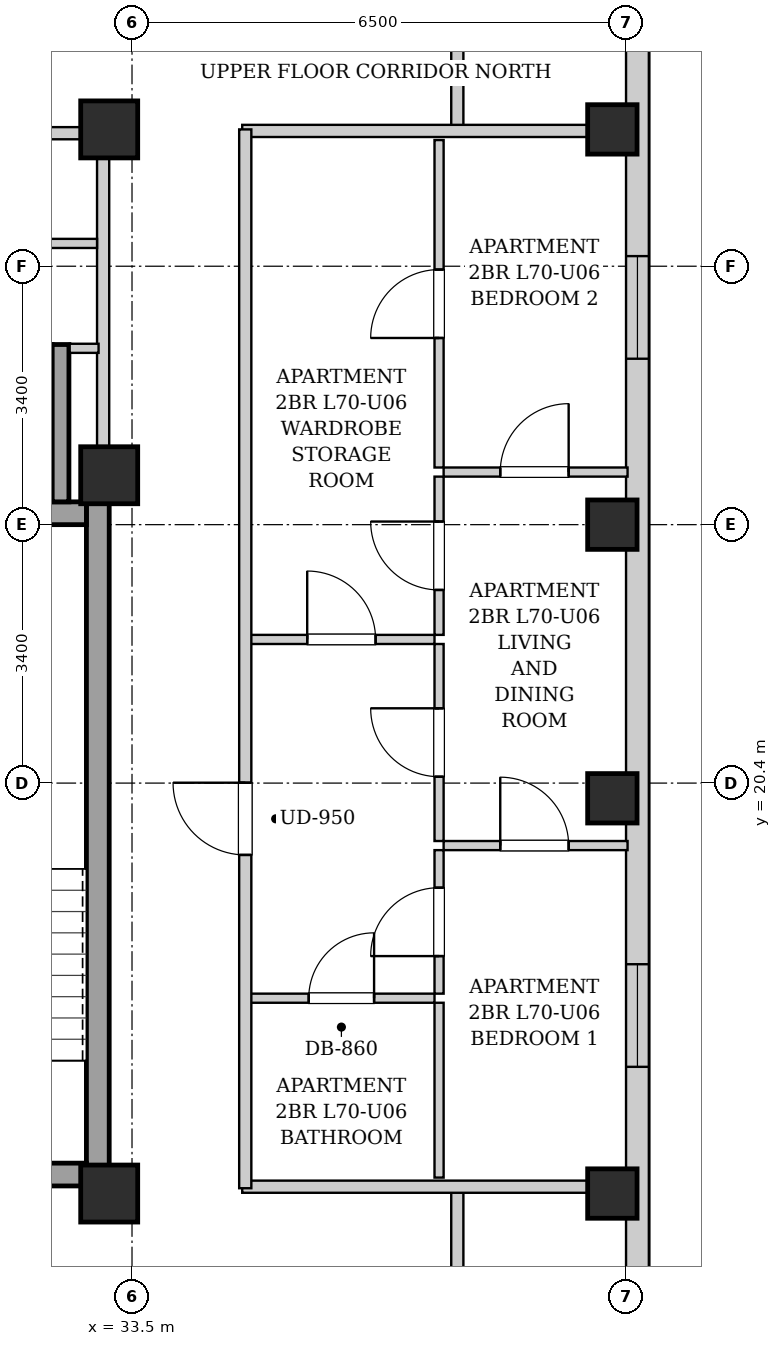
"""IFC4 building model, lengths in metres.
Left out: names, types, materials, properties, quantities, classifications, styles, units other than length and angle.
Written with IfcOpenShell. Run it as: python <this file> out.ifc"""

import sys

from ifc_helpers import new_model, si_unit, direction, frame, frame_2d, origin, origin_2d, place, context, subcontext, project, spatial, rectangle, extrude, element, fill, save


model = new_model("IFC4")
c1 = context("Model", 3, precision=1e-05, world=origin(), true_north=direction((0.0, 1.0)))
c2 = subcontext(c1, "Body", "Model", "MODEL_VIEW")
j1 = project(units=[si_unit("LENGTHUNIT", "METRE"), si_unit("PLANEANGLEUNIT", "RADIAN")], contexts=[c1])
p1 = place(None, origin())
s1 = spatial("IfcSite", under=j1, at=p1, CompositionType="ELEMENT")
p2 = place(p1, origin())
s2 = spatial("IfcBuilding", under=s1, at=p2, CompositionType="ELEMENT")
p3 = place(p2, frame((0.0, 0.0, 241.1)))
s3 = spatial("IfcBuildingStorey", under=s2, at=p3, CompositionType="ELEMENT", Elevation=241.1)
for number, where, z_axis, x_axis in (
    (1, (39.82, 15.0, 0.0), (0.0, 0.0, 1.0), (1.0, 0.0, 0.0)),
    (2, (39.82, 20.2, 0.0), (0.0, 0.0, 1.0), (1.0, 0.0, 0.0)),
    (3, (39.82, 23.8, 0.0), (0.0, 0.0, 1.0), (1.0, 0.0, 0.0)),
    (4, (39.82, 29.0, 0.0), (0.0, 0.0, 1.0), (1.0, 0.0, 0.0)),
):
    element("IfcColumn", number, at=place(p3, frame(where, z_axis=z_axis, x_axis=x_axis)), inside=s3, PredefinedType="COLUMN", context=c2, shape_type="SweptSolid", body=[
        extrude(rectangle(XDim=0.65, YDim=0.65, at=origin_2d()), origin(), (0.0, 0.0, 1.0), 3.4),
    ])
for number, where, z_axis, x_axis in (
    (5, (33.2, 15.0, 0.0), (0.0, 0.0, 1.0), (1.0, 0.0, 0.0)),
    (6, (33.2, 29.0, 0.0), (0.0, 0.0, 1.0), (1.0, 0.0, 0.0)),
    (7, (33.2, 24.45, 0.0), (0.0, 0.0, 1.0), (1.0, 0.0, 0.0)),
):
    element("IfcColumn", number, at=place(p3, frame(where, z_axis=z_axis, x_axis=x_axis)), inside=s3, PredefinedType="COLUMN", context=c2, shape_type="SweptSolid", body=[
        extrude(rectangle(XDim=0.75, YDim=0.75, at=origin_2d()), origin(), (0.0, 0.0, 1.0), 3.4),
    ])
p4 = place(p3, frame((40.15, 37.7, 0.0), z_axis=(0.0, 0.0, 1.0), x_axis=(0.0, -1.0, 0.0)))
e8 = element("IfcWall", 8, at=p4, inside=s3, PredefinedType="SOLIDWALL", context=c2, shape_type="SweptSolid", body=[
    extrude(rectangle(XDim=31.4, YDim=0.3, at=frame_2d((15.7, 0.0))), origin(), (0.0, 0.0, 1.0), 3.14),
])
p5 = place(p4, frame((28.396, 0.0, 0.55)))
e9 = element("IfcOpeningElement", 9, at=p5, cuts=e8, PredefinedType="OPENING", context=c2, shape_type="SweptSolid", body=[
    extrude(rectangle(XDim=1.35, YDim=1.2, at=frame_2d((0.675, 0.6))), frame((0.0, 0.16, 0.0), z_axis=(0.0, -1.0, 0.0), x_axis=(1.0, 0.0, 0.0)), (0.0, 0.0, 1.0), 0.32),
])
p6 = place(p4, frame((1.653, 0.0, 0.55)))
e10 = element("IfcOpeningElement", 10, at=p6, cuts=e8, PredefinedType="OPENING", context=c2, shape_type="SweptSolid", body=[
    extrude(rectangle(XDim=1.35, YDim=1.2, at=frame_2d((0.675, 0.6))), frame((0.0, 0.16, 0.0), z_axis=(0.0, -1.0, 0.0), x_axis=(1.0, 0.0, 0.0)), (0.0, 0.0, 1.0), 0.32),
])
p7 = place(p4, frame((19.683, 0.0, 0.55)))
e11 = element("IfcOpeningElement", 11, at=p7, cuts=e8, PredefinedType="OPENING", context=c2, shape_type="SweptSolid", body=[
    extrude(rectangle(XDim=1.35, YDim=1.2, at=frame_2d((0.675, 0.6))), frame((0.0, 0.16, 0.0), z_axis=(0.0, -1.0, 0.0), x_axis=(1.0, 0.0, 0.0)), (0.0, 0.0, 1.0), 0.32),
])
p8 = place(p4, frame((10.367, 0.0, 0.55)))
e12 = element("IfcOpeningElement", 12, at=p8, cuts=e8, PredefinedType="OPENING", context=c2, shape_type="SweptSolid", body=[
    extrude(rectangle(XDim=1.35, YDim=1.2, at=frame_2d((0.675, 0.6))), frame((0.0, 0.16, 0.0), z_axis=(0.0, -1.0, 0.0), x_axis=(1.0, 0.0, 0.0)), (0.0, 0.0, 1.0), 0.32),
])
p9 = place(p3, frame((33.05, 15.1, 0.0), z_axis=(0.0, 0.0, 1.0), x_axis=(0.0, 1.0, 0.0)))
e13 = element("IfcWall", 13, at=p9, inside=s3, PredefinedType="SHEAR", context=c2, shape_type="SweptSolid", body=[
    extrude(rectangle(XDim=9.0, YDim=0.3, at=frame_2d((4.5, 0.0))), origin(), (0.0, 0.0, 1.0), 3.14),
])
p10 = place(p3, frame((30.05, 23.95, 0.0), z_axis=(0.0, 0.0, 1.0), x_axis=(1.0, 0.0, 0.0)))
e14 = element("IfcWall", 14, at=p10, inside=s3, PredefinedType="SHEAR", context=c2, shape_type="SweptSolid", body=[
    extrude(rectangle(XDim=2.85, YDim=0.3, at=frame_2d((1.425, 0.0))), origin(), (0.0, 0.0, 1.0), 3.14),
])
p11 = place(p3, frame((30.05, 15.25, 0.0), z_axis=(0.0, 0.0, 1.0), x_axis=(1.0, 0.0, 0.0)))
e15 = element("IfcWall", 15, at=p11, inside=s3, PredefinedType="SHEAR", context=c2, shape_type="SweptSolid", body=[
    extrude(rectangle(XDim=2.85, YDim=0.3, at=frame_2d((1.425, 0.0))), origin(), (0.0, 0.0, 1.0), 3.14),
])
p12 = place(p11, frame((0.86, 0.0, 0.0)))
e16 = element("IfcOpeningElement", 16, at=p12, cuts=e15, PredefinedType="OPENING", context=c2, shape_type="SweptSolid", body=[
    extrude(rectangle(XDim=1.1, YDim=2.05, at=frame_2d((0.55, 1.025))), frame((0.0, 0.16, 0.0), z_axis=(0.0, -1.0, 0.0), x_axis=(1.0, 0.0, 0.0)), (0.0, 0.0, 1.0), 0.32),
])
p13 = place(p3, frame((32.56, 24.1, 0.0), z_axis=(0.0, 0.0, 1.0), x_axis=(0.0, 1.0, 0.0)))
e17 = element("IfcWall", 17, at=p13, inside=s3, PredefinedType="SHEAR", context=c2, shape_type="SweptSolid", body=[
    extrude(rectangle(XDim=2.07, YDim=0.22, at=frame_2d((1.035, 0.0))), origin(), (0.0, 0.0, 1.0), 3.14),
])
p14 = place(p3, frame((33.12, 24.12, 0.0), z_axis=(0.0, 0.0, 1.0), x_axis=(0.0, 1.0, 0.0)))
e18 = element("IfcWall", 18, at=p14, inside=s3, PredefinedType="PARTITIONING", context=c2, shape_type="SweptSolid", body=[
    extrude(rectangle(XDim=4.76, YDim=0.16, at=frame_2d((2.38, 0.0))), origin(), (0.0, 0.0, 1.0), 3.14),
])
p15 = place(p3, frame((32.68, 26.12, 0.0), z_axis=(0.0, 0.0, 1.0), x_axis=(1.0, 0.0, 0.0)))
e19 = element("IfcWall", 19, at=p15, inside=s3, PredefinedType="PARTITIONING", context=c2, shape_type="SweptSolid", body=[
    extrude(rectangle(XDim=0.38, YDim=0.12, at=frame_2d((0.19, 0.0))), origin(), (0.0, 0.0, 1.0), 3.14),
])
p16 = place(p3, frame((30.12, 27.5, 0.0), z_axis=(0.0, 0.0, 1.0), x_axis=(1.0, 0.0, 0.0)))
e20 = element("IfcWall", 20, at=p16, inside=s3, PredefinedType="PARTITIONING", context=c2, shape_type="SweptSolid", body=[
    extrude(rectangle(XDim=2.92, YDim=0.12, at=frame_2d((1.46, 0.0))), origin(), (0.0, 0.0, 1.0), 3.14),
])
p17 = place(p16, frame((0.97, 0.0, 0.0)))
e21 = element("IfcOpeningElement", 21, at=p17, cuts=e20, PredefinedType="OPENING", context=c2, shape_type="SweptSolid", body=[
    extrude(rectangle(XDim=0.86, YDim=2.05, at=frame_2d((0.43, 1.025))), frame((0.0, 0.07, 0.0), z_axis=(0.0, -1.0, 0.0), x_axis=(1.0, 0.0, 0.0)), (0.0, 0.0, 1.0), 0.14),
])
p18 = place(p3, frame((25.72, 28.95, 0.0), z_axis=(0.0, 0.0, 1.0), x_axis=(1.0, 0.0, 0.0)))
e22 = element("IfcWall", 22, at=p18, inside=s3, PredefinedType="PARTITIONING", context=c2, shape_type="SweptSolid", body=[
    extrude(rectangle(XDim=7.32, YDim=0.16, at=frame_2d((3.66, 0.0))), origin(), (0.0, 0.0, 1.0), 2.668),
])
p19 = place(p18, frame((1.27, 0.0, 0.0)))
e23 = element("IfcOpeningElement", 23, at=p19, cuts=e22, PredefinedType="OPENING", context=c2, shape_type="SweptSolid", body=[
    extrude(rectangle(XDim=0.86, YDim=2.05, at=frame_2d((0.43, 1.025))), frame((0.0, 0.09, 0.0), z_axis=(0.0, -1.0, 0.0), x_axis=(1.0, 0.0, 0.0)), (0.0, 0.0, 1.0), 0.18),
])
for number, where, z_axis, x_axis in (
    (24, (37.78, 13.51, 0.0), (0.0, 0.0, 1.0), (0.0, 1.0, 0.0)),
    (25, (37.78, 28.98, 0.0), (0.0, 0.0, 1.0), (0.0, 1.0, 0.0)),
):
    element("IfcWall", number, at=place(p3, frame(where, z_axis=z_axis, x_axis=x_axis)), inside=s3, PredefinedType="PARTITIONING", context=c2, shape_type="SweptSolid", body=[
        extrude(rectangle(XDim=1.58, YDim=0.16, at=frame_2d((0.79, 0.0))), origin(), (0.0, 0.0, 1.0), 3.14),
    ])
for number, where, z_axis, x_axis in (
    (26, (34.95, 15.09, 0.0), (0.0, 0.0, 1.0), (1.0, 0.0, 0.0)),
    (27, (34.95, 28.98, 0.0), (0.0, 0.0, 1.0), (1.0, 0.0, 0.0)),
):
    element("IfcWall", number, at=place(p3, frame(where, z_axis=z_axis, x_axis=x_axis)), inside=s3, PredefinedType="PARTITIONING", context=c2, shape_type="SweptSolid", body=[
        extrude(rectangle(XDim=5.07, YDim=0.16, at=frame_2d((2.535, 0.0))), origin(), (0.0, 0.0, 1.0), 2.668),
    ])
p20 = place(p3, frame((35.03, 22.29, 0.0), z_axis=(0.0, 0.0, 1.0), x_axis=(1.0, 0.0, 0.0)))
e28 = element("IfcWall", 28, at=p20, inside=s3, PredefinedType="PARTITIONING", context=c2, shape_type="SweptSolid", body=[
    extrude(rectangle(XDim=2.45, YDim=0.12, at=frame_2d((1.225, 0.0))), origin(), (0.0, 0.0, 1.0), 3.14),
])
p21 = place(p20, frame((0.775, 0.0, 0.0)))
e29 = element("IfcOpeningElement", 29, at=p21, cuts=e28, PredefinedType="OPENING", context=c2, shape_type="SweptSolid", body=[
    extrude(rectangle(XDim=0.9, YDim=2.05, at=frame_2d((0.45, 1.025))), frame((0.0, 0.07, 0.0), z_axis=(0.0, -1.0, 0.0), x_axis=(1.0, 0.0, 0.0)), (0.0, 0.0, 1.0), 0.14),
])
p22 = place(p3, frame((37.54, 22.35, 0.0), z_axis=(0.0, 0.0, 1.0), x_axis=(0.0, 1.0, 0.0)))
e30 = element("IfcWall", 30, at=p22, inside=s3, PredefinedType="PARTITIONING", context=c2, shape_type="SweptSolid", body=[
    extrude(rectangle(XDim=2.082, YDim=0.12, at=frame_2d((1.041, 0.0))), origin(), (0.0, 0.0, 1.0), 3.14),
])
p23 = place(p22, frame((0.591, 0.0, 0.0)))
e31 = element("IfcOpeningElement", 31, at=p23, cuts=e30, PredefinedType="OPENING", context=c2, shape_type="SweptSolid", body=[
    extrude(rectangle(XDim=0.9, YDim=2.05, at=frame_2d((0.45, 1.025))), frame((0.0, 0.07, 0.0), z_axis=(0.0, -1.0, 0.0), x_axis=(1.0, 0.0, 0.0)), (0.0, 0.0, 1.0), 0.14),
])
p24 = place(p3, frame((37.54, 24.552, 0.0), z_axis=(0.0, 0.0, 1.0), x_axis=(0.0, 1.0, 0.0)))
e32 = element("IfcWall", 32, at=p24, inside=s3, PredefinedType="PARTITIONING", context=c2, shape_type="SweptSolid", body=[
    extrude(rectangle(XDim=4.308, YDim=0.12, at=frame_2d((2.154, 0.0))), origin(), (0.0, 0.0, 1.0), 3.14),
])
p25 = place(p24, frame((1.704, 0.0, 0.0)))
e33 = element("IfcOpeningElement", 33, at=p25, cuts=e32, PredefinedType="OPENING", context=c2, shape_type="SweptSolid", body=[
    extrude(rectangle(XDim=0.9, YDim=2.05, at=frame_2d((0.45, 1.025))), frame((0.0, 0.07, 0.0), z_axis=(0.0, -1.0, 0.0), x_axis=(1.0, 0.0, 0.0)), (0.0, 0.0, 1.0), 0.14),
])
p26 = place(p3, frame((35.03, 17.57, 0.0), z_axis=(0.0, 0.0, 1.0), x_axis=(1.0, 0.0, 0.0)))
e34 = element("IfcWall", 34, at=p26, inside=s3, PredefinedType="PARTITIONING", context=c2, shape_type="SweptSolid", body=[
    extrude(rectangle(XDim=2.45, YDim=0.12, at=frame_2d((1.225, 0.0))), origin(), (0.0, 0.0, 1.0), 3.14),
])
p27 = place(p26, frame((0.795, 0.0, 0.0)))
e35 = element("IfcOpeningElement", 35, at=p27, cuts=e34, PredefinedType="OPENING", context=c2, shape_type="SweptSolid", body=[
    extrude(rectangle(XDim=0.86, YDim=2.05, at=frame_2d((0.43, 1.025))), frame((0.0, 0.07, 0.0), z_axis=(0.0, -1.0, 0.0), x_axis=(1.0, 0.0, 0.0)), (0.0, 0.0, 1.0), 0.14),
])
p28 = place(p3, frame((37.54, 15.21, 0.0), z_axis=(0.0, 0.0, 1.0), x_axis=(0.0, 1.0, 0.0)))
e36 = element("IfcWall", 36, at=p28, inside=s3, PredefinedType="PARTITIONING", context=c2, shape_type="SweptSolid", body=[
    extrude(rectangle(XDim=2.3, YDim=0.12, at=frame_2d((1.15, 0.0))), origin(), (0.0, 0.0, 1.0), 3.14),
])
p29 = place(p3, frame((37.54, 17.63, 0.0), z_axis=(0.0, 0.0, 1.0), x_axis=(0.0, 1.0, 0.0)))
e37 = element("IfcWall", 37, at=p29, inside=s3, PredefinedType="PARTITIONING", context=c2, shape_type="SweptSolid", body=[
    extrude(rectangle(XDim=1.888, YDim=0.12, at=frame_2d((0.944, 0.0))), origin(), (0.0, 0.0, 1.0), 3.14),
])
p30 = place(p29, frame((0.494, 0.0, 0.0)))
e38 = element("IfcOpeningElement", 38, at=p30, cuts=e37, PredefinedType="OPENING", context=c2, shape_type="SweptSolid", body=[
    extrude(rectangle(XDim=0.9, YDim=2.05, at=frame_2d((0.45, 1.025))), frame((0.0, 0.07, 0.0), z_axis=(0.0, -1.0, 0.0), x_axis=(1.0, 0.0, 0.0)), (0.0, 0.0, 1.0), 0.14),
])
p31 = place(p3, frame((37.54, 19.638, 0.0), z_axis=(0.0, 0.0, 1.0), x_axis=(0.0, 1.0, 0.0)))
e39 = element("IfcWall", 39, at=p31, inside=s3, PredefinedType="PARTITIONING", context=c2, shape_type="SweptSolid", body=[
    extrude(rectangle(XDim=2.592, YDim=0.12, at=frame_2d((1.296, 0.0))), origin(), (0.0, 0.0, 1.0), 3.14),
])
p32 = place(p31, frame((0.846, 0.0, 0.0)))
e40 = element("IfcOpeningElement", 40, at=p32, cuts=e39, PredefinedType="OPENING", context=c2, shape_type="SweptSolid", body=[
    extrude(rectangle(XDim=0.9, YDim=2.05, at=frame_2d((0.45, 1.025))), frame((0.0, 0.07, 0.0), z_axis=(0.0, -1.0, 0.0), x_axis=(1.0, 0.0, 0.0)), (0.0, 0.0, 1.0), 0.14),
])
p33 = place(p3, frame((37.6, 19.578, 0.0), z_axis=(0.0, 0.0, 1.0), x_axis=(1.0, 0.0, 0.0)))
e41 = element("IfcWall", 41, at=p33, inside=s3, PredefinedType="PARTITIONING", context=c2, shape_type="SweptSolid", body=[
    extrude(rectangle(XDim=2.42, YDim=0.12, at=frame_2d((1.21, 0.0))), origin(), (0.0, 0.0, 1.0), 3.14),
])
p34 = place(p33, frame((0.745, 0.0, 0.0)))
e42 = element("IfcOpeningElement", 42, at=p34, cuts=e41, PredefinedType="OPENING", context=c2, shape_type="SweptSolid", body=[
    extrude(rectangle(XDim=0.9, YDim=2.05, at=frame_2d((0.45, 1.025))), frame((0.0, 0.07, 0.0), z_axis=(0.0, -1.0, 0.0), x_axis=(1.0, 0.0, 0.0)), (0.0, 0.0, 1.0), 0.14),
])
p35 = place(p3, frame((37.6, 24.492, 0.0), z_axis=(0.0, 0.0, 1.0), x_axis=(1.0, 0.0, 0.0)))
e43 = element("IfcWall", 43, at=p35, inside=s3, PredefinedType="PARTITIONING", context=c2, shape_type="SweptSolid", body=[
    extrude(rectangle(XDim=2.42, YDim=0.12, at=frame_2d((1.21, 0.0))), origin(), (0.0, 0.0, 1.0), 2.878),
])
p36 = place(p35, frame((0.745, 0.0, 0.0)))
e44 = element("IfcOpeningElement", 44, at=p36, cuts=e43, PredefinedType="OPENING", context=c2, shape_type="SweptSolid", body=[
    extrude(rectangle(XDim=0.9, YDim=2.05, at=frame_2d((0.45, 1.025))), frame((0.0, 0.07, 0.0), z_axis=(0.0, -1.0, 0.0), x_axis=(1.0, 0.0, 0.0)), (0.0, 0.0, 1.0), 0.14),
])
p37 = place(p3, frame((34.99, 15.07, 0.0), z_axis=(0.0, 0.0, 1.0), x_axis=(0.0, 1.0, 0.0)))
e45 = element("IfcWall", 45, at=p37, inside=s3, PredefinedType="PARTITIONING", context=c2, shape_type="SweptSolid", body=[
    extrude(rectangle(XDim=13.93, YDim=0.16, at=frame_2d((6.965, 0.0))), origin(), (0.0, 0.0, 1.0), 3.14),
])
p38 = place(p37, frame((4.385, 0.0, 0.0)))
e46 = element("IfcOpeningElement", 46, at=p38, cuts=e45, PredefinedType="OPENING", context=c2, shape_type="SweptSolid", body=[
    extrude(rectangle(XDim=0.95, YDim=2.1, at=frame_2d((0.475, 1.05))), frame((0.0, 0.09, 0.0), z_axis=(0.0, -1.0, 0.0), x_axis=(1.0, 0.0, 0.0)), (0.0, 0.0, 1.0), 0.18),
])
p39 = place(p21, origin())
e47 = element("IfcDoor", 47, at=p39, inside=s3, OperationType="SINGLE_SWING_LEFT", PredefinedType="DOOR", context=c2, shape_type="SweptSolid", body=[
    extrude(rectangle(XDim=0.9, YDim=2.05, at=frame_2d((0.45, 1.025))), frame((0.0, 0.025, 0.0), z_axis=(0.0, -1.0, 0.0), x_axis=(1.0, 0.0, 0.0)), (0.0, 0.0, 1.0), 0.05),
])
fill(e29, e47)
p40 = place(p23, origin())
e48 = element("IfcDoor", 48, at=p40, inside=s3, OperationType="SINGLE_SWING_RIGHT", PredefinedType="DOOR", context=c2, shape_type="SweptSolid", body=[
    extrude(rectangle(XDim=0.9, YDim=2.05, at=frame_2d((0.45, 1.025))), frame((0.0, 0.025, 0.0), z_axis=(0.0, -1.0, 0.0), x_axis=(1.0, 0.0, 0.0)), (0.0, 0.0, 1.0), 0.05),
])
fill(e31, e48)
p41 = place(p25, origin())
e49 = element("IfcDoor", 49, at=p41, inside=s3, OperationType="SINGLE_SWING_LEFT", PredefinedType="DOOR", context=c2, shape_type="SweptSolid", body=[
    extrude(rectangle(XDim=0.9, YDim=2.05, at=frame_2d((0.45, 1.025))), frame((0.0, 0.025, 0.0), z_axis=(0.0, -1.0, 0.0), x_axis=(1.0, 0.0, 0.0)), (0.0, 0.0, 1.0), 0.05),
])
fill(e33, e49)
p42 = place(p27, origin())
e50 = element("IfcDoor", 50, at=p42, inside=s3, OperationType="SINGLE_SWING_RIGHT", PredefinedType="DOOR", context=c2, shape_type="SweptSolid", body=[
    extrude(rectangle(XDim=0.86, YDim=2.05, at=frame_2d((0.43, 1.025))), frame((0.0, 0.025, 0.0), z_axis=(0.0, -1.0, 0.0), x_axis=(1.0, 0.0, 0.0)), (0.0, 0.0, 1.0), 0.05),
])
fill(e35, e50)
p43 = place(p30, origin())
e51 = element("IfcDoor", 51, at=p43, inside=s3, OperationType="SINGLE_SWING_LEFT", PredefinedType="DOOR", context=c2, shape_type="SweptSolid", body=[
    extrude(rectangle(XDim=0.9, YDim=2.05, at=frame_2d((0.45, 1.025))), frame((0.0, 0.025, 0.0), z_axis=(0.0, -1.0, 0.0), x_axis=(1.0, 0.0, 0.0)), (0.0, 0.0, 1.0), 0.05),
])
fill(e38, e51)
p44 = place(p32, origin())
e52 = element("IfcDoor", 52, at=p44, inside=s3, OperationType="SINGLE_SWING_RIGHT", PredefinedType="DOOR", context=c2, shape_type="SweptSolid", body=[
    extrude(rectangle(XDim=0.9, YDim=2.05, at=frame_2d((0.45, 1.025))), frame((0.0, 0.025, 0.0), z_axis=(0.0, -1.0, 0.0), x_axis=(1.0, 0.0, 0.0)), (0.0, 0.0, 1.0), 0.05),
])
fill(e40, e52)
p45 = place(p34, origin())
e53 = element("IfcDoor", 53, at=p45, inside=s3, OperationType="SINGLE_SWING_LEFT", PredefinedType="DOOR", context=c2, shape_type="SweptSolid", body=[
    extrude(rectangle(XDim=0.9, YDim=2.05, at=frame_2d((0.45, 1.025))), frame((0.0, 0.025, 0.0), z_axis=(0.0, -1.0, 0.0), x_axis=(1.0, 0.0, 0.0)), (0.0, 0.0, 1.0), 0.05),
])
fill(e42, e53)
p46 = place(p36, origin())
e54 = element("IfcDoor", 54, at=p46, inside=s3, OperationType="SINGLE_SWING_RIGHT", PredefinedType="DOOR", context=c2, shape_type="SweptSolid", body=[
    extrude(rectangle(XDim=0.9, YDim=2.05, at=frame_2d((0.45, 1.025))), frame((0.0, 0.025, 0.0), z_axis=(0.0, -1.0, 0.0), x_axis=(1.0, 0.0, 0.0)), (0.0, 0.0, 1.0), 0.05),
])
fill(e44, e54)
p47 = place(p38, origin())
e55 = element("IfcDoor", 55, at=p47, inside=s3, OperationType="SINGLE_SWING_RIGHT", PredefinedType="DOOR", context=c2, shape_type="SweptSolid", body=[
    extrude(rectangle(XDim=0.95, YDim=2.1, at=frame_2d((0.475, 1.05))), frame((0.0, 0.025, 0.0), z_axis=(0.0, -1.0, 0.0), x_axis=(1.0, 0.0, 0.0)), (0.0, 0.0, 1.0), 0.05),
])
fill(e46, e55)
p48 = place(p7, origin())
e56 = element("IfcWindow", 56, at=p48, inside=s3, PartitioningType="SINGLE_PANEL", PredefinedType="WINDOW", context=c2, shape_type="SweptSolid", body=[
    extrude(rectangle(XDim=1.35, YDim=1.2, at=frame_2d((0.675, 0.6))), frame((0.0, 0.03, 0.0), z_axis=(0.0, -1.0, 0.0), x_axis=(1.0, 0.0, 0.0)), (0.0, 0.0, 1.0), 0.06),
])
fill(e11, e56)
p49 = place(p8, origin())
e57 = element("IfcWindow", 57, at=p49, inside=s3, PartitioningType="SINGLE_PANEL", PredefinedType="WINDOW", context=c2, shape_type="SweptSolid", body=[
    extrude(rectangle(XDim=1.35, YDim=1.2, at=frame_2d((0.675, 0.6))), frame((0.0, 0.03, 0.0), z_axis=(0.0, -1.0, 0.0), x_axis=(1.0, 0.0, 0.0)), (0.0, 0.0, 1.0), 0.06),
])
fill(e12, e57)
save(model, sys.argv[1])
